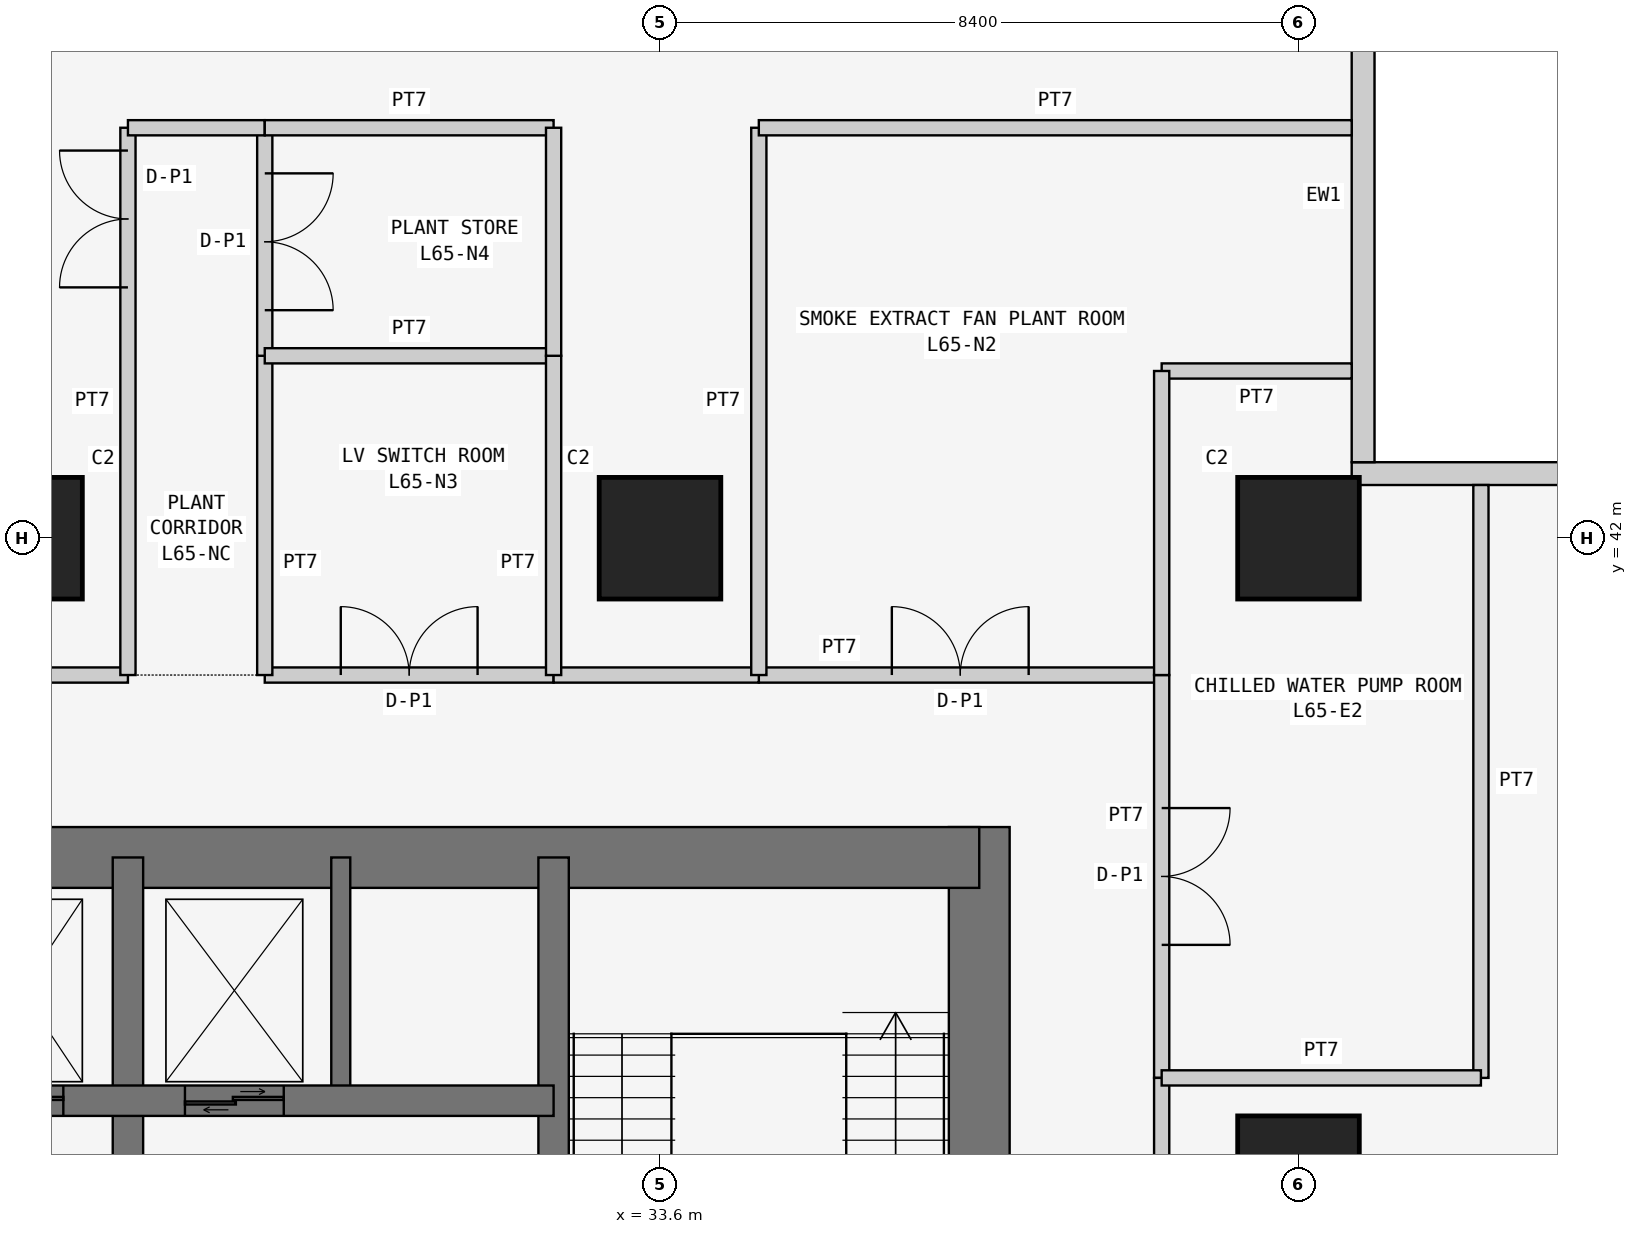
"""IFC4 building model, lengths in metres.
Left out: names, types, materials, properties, quantities, classifications, styles, units other than length and angle.
Written with IfcOpenShell. Run it as: python <this file> out.ifc"""

import sys

from ifc_helpers import new_model, si_unit, direction, frame, frame_2d, origin, origin_2d, place, context, subcontext, project, spatial, rectangle, extrude, element, fill, save


model = new_model("IFC4")
c1 = context("Model", 3, precision=1e-05, world=origin(), true_north=direction((0.0, 1.0)))
c2 = subcontext(c1, "Body", "Model", "MODEL_VIEW")
j1 = project(units=[si_unit("LENGTHUNIT", "METRE"), si_unit("PLANEANGLEUNIT", "RADIAN")], contexts=[c1])
p1 = place(None, origin())
s1 = spatial("IfcSite", under=j1, at=p1, CompositionType="ELEMENT")
p2 = place(p1, origin())
s2 = spatial("IfcBuilding", under=s1, at=p2, CompositionType="ELEMENT")
p3 = place(p2, frame((0.0, 0.0, 248.1)))
s3 = spatial("IfcBuildingStorey", under=s2, at=p3, CompositionType="ELEMENT", Elevation=248.1)
for number, where, z_axis, x_axis in (
    (1, (25.2, 42.0, 0.0), (0.0, 0.0, 1.0), (1.0, 0.0, 0.0)),
    (2, (33.6, 42.0, 0.0), (0.0, 0.0, 1.0), (1.0, 0.0, 0.0)),
    (3, (42.0, 33.6, 0.0), (0.0, 0.0, 1.0), (1.0, 0.0, 0.0)),
    (4, (42.0, 42.0, 0.0), (0.0, 0.0, 1.0), (1.0, 0.0, 0.0)),
):
    element("IfcColumn", number, at=place(p3, frame(where, z_axis=z_axis, x_axis=x_axis)), inside=s3, PredefinedType="COLUMN", context=c2, shape_type="SweptSolid", body=[
        extrude(rectangle(XDim=1.6, YDim=1.6, at=origin_2d()), origin(), (0.0, 0.0, 1.0), 6.0),
    ])
p4 = place(p3, frame((37.8, 21.0, 0.0), z_axis=(0.0, 0.0, 1.0), x_axis=(0.0, 1.0, 0.0)))
e5 = element("IfcWall", 5, at=p4, inside=s3, PredefinedType="SHEAR", context=c2, shape_type="SweptSolid", body=[
    extrude(rectangle(XDim=17.2, YDim=0.8, at=frame_2d((8.6, 0.0))), origin(), (0.0, 0.0, 1.0), 6.0),
])
p5 = place(p4, frame((5.2, 0.0, 0.0)))
e6 = element("IfcOpeningElement", 6, at=p5, cuts=e5, PredefinedType="OPENING", context=c2, shape_type="SweptSolid", body=[
    extrude(rectangle(XDim=1.2, YDim=2.1, at=frame_2d((0.6, 1.05))), frame((0.0, 0.41, 0.0), z_axis=(0.0, -1.0, 0.0), x_axis=(1.0, 0.0, 0.0)), (0.0, 0.0, 1.0), 0.82),
])
p6 = place(p3, frame((37.8, 37.8, 0.0), z_axis=(0.0, 0.0, 1.0), x_axis=(-1.0, 0.0, 0.0)))
e7 = element("IfcWall", 7, at=p6, inside=s3, PredefinedType="SHEAR", context=c2, shape_type="SweptSolid", body=[
    extrude(rectangle(XDim=17.2, YDim=0.8, at=frame_2d((8.6, 0.0))), origin(), (0.0, 0.0, 1.0), 6.0),
])
p7 = place(p3, frame((26.6, 21.0, 0.0), z_axis=(0.0, 0.0, 1.0), x_axis=(0.0, 1.0, 0.0)))
e8 = element("IfcWall", 8, at=p7, inside=s3, PredefinedType="SHEAR", context=c2, shape_type="SweptSolid", body=[
    extrude(rectangle(XDim=16.8, YDim=0.4, at=frame_2d((8.4, 0.0))), origin(), (0.0, 0.0, 1.0), 6.0),
])
p8 = place(p7, frame((10.4, 0.0, 0.0)))
e9 = element("IfcOpeningElement", 9, at=p8, cuts=e8, PredefinedType="OPENING", context=c2, shape_type="SweptSolid", body=[
    extrude(rectangle(XDim=1.2, YDim=2.1, at=frame_2d((0.6, 1.05))), frame((0.0, 0.21, 0.0), z_axis=(0.0, -1.0, 0.0), x_axis=(1.0, 0.0, 0.0)), (0.0, 0.0, 1.0), 0.42),
])
p9 = place(p3, frame((21.0, 34.6, 0.0), z_axis=(0.0, 0.0, 1.0), x_axis=(1.0, 0.0, 0.0)))
e10 = element("IfcWall", 10, at=p9, inside=s3, PredefinedType="SHEAR", context=c2, shape_type="SweptSolid", body=[
    extrude(rectangle(XDim=11.2, YDim=0.4, at=frame_2d((5.6, 0.0))), origin(), (0.0, 0.0, 1.0), 6.0),
])
p10 = place(p9, frame((1.0, 0.0, 0.0)))
e11 = element("IfcOpeningElement", 11, at=p10, cuts=e10, PredefinedType="OPENING", context=c2, shape_type="SweptSolid", body=[
    extrude(rectangle(XDim=1.1, YDim=2.1, at=frame_2d((0.55, 1.05))), frame((0.0, 0.21, 0.0), z_axis=(0.0, -1.0, 0.0), x_axis=(1.0, 0.0, 0.0)), (0.0, 0.0, 1.0), 0.42),
])
p11 = place(p9, frame((3.65, 0.0, 0.0)))
e12 = element("IfcOpeningElement", 12, at=p11, cuts=e10, PredefinedType="OPENING", context=c2, shape_type="SweptSolid", body=[
    extrude(rectangle(XDim=1.1, YDim=2.1, at=frame_2d((0.55, 1.05))), frame((0.0, 0.21, 0.0), z_axis=(0.0, -1.0, 0.0), x_axis=(1.0, 0.0, 0.0)), (0.0, 0.0, 1.0), 0.42),
])
p12 = place(p9, frame((6.35, 0.0, 0.0)))
e13 = element("IfcOpeningElement", 13, at=p12, cuts=e10, PredefinedType="OPENING", context=c2, shape_type="SweptSolid", body=[
    extrude(rectangle(XDim=1.3, YDim=2.1, at=frame_2d((0.65, 1.05))), frame((0.0, 0.21, 0.0), z_axis=(0.0, -1.0, 0.0), x_axis=(1.0, 0.0, 0.0)), (0.0, 0.0, 1.0), 0.42),
])
p13 = place(p3, frame((32.2, 29.2, 0.0), z_axis=(0.0, 0.0, 1.0), x_axis=(0.0, 1.0, 0.0)))
e14 = element("IfcWall", 14, at=p13, inside=s3, PredefinedType="SHEAR", context=c2, shape_type="SweptSolid", body=[
    extrude(rectangle(XDim=8.6, YDim=0.4, at=frame_2d((4.3, 0.0))), origin(), (0.0, 0.0, 1.0), 6.0),
])
p14 = place(p3, frame((29.4, 34.6, 0.0), z_axis=(0.0, 0.0, 1.0), x_axis=(0.0, 1.0, 0.0)))
e15 = element("IfcWall", 15, at=p14, inside=s3, PredefinedType="SHEAR", context=c2, shape_type="SweptSolid", body=[
    extrude(rectangle(XDim=3.2, YDim=0.25, at=frame_2d((1.6, 0.0))), origin(), (0.0, 0.0, 1.0), 6.0),
])
p15 = place(p3, frame((50.0, 42.85, 0.0), z_axis=(0.0, 0.0, 1.0), x_axis=(-1.0, 0.0, 0.0)))
e16 = element("IfcWall", 16, at=p15, inside=s3, PredefinedType="SOLIDWALL", context=c2, shape_type="SweptSolid", body=[
    extrude(rectangle(XDim=7.3, YDim=0.3, at=frame_2d((3.65, 0.0))), origin(), (0.0, 0.0, 1.0), 5.85),
])
p16 = place(p3, frame((42.85, 43.0, 0.0), z_axis=(0.0, 0.0, 1.0), x_axis=(0.0, 1.0, 0.0)))
e17 = element("IfcWall", 17, at=p16, inside=s3, PredefinedType="SOLIDWALL", context=c2, shape_type="SweptSolid", body=[
    extrude(rectangle(XDim=7.0, YDim=0.3, at=frame_2d((3.5, 0.0))), origin(), (0.0, 0.0, 1.0), 5.85),
])
p17 = place(p3, frame((34.9, 40.2, 0.0), z_axis=(0.0, 0.0, 1.0), x_axis=(1.0, 0.0, 0.0)))
e18 = element("IfcWall", 18, at=p17, inside=s3, PredefinedType="PARTITIONING", context=c2, shape_type="SweptSolid", body=[
    extrude(rectangle(XDim=5.3, YDim=0.2, at=frame_2d((2.65, 0.0))), origin(), (0.0, 0.0, 1.0), 5.85),
])
p18 = place(p17, frame((1.75, 0.0, 0.0)))
e19 = element("IfcOpeningElement", 19, at=p18, cuts=e18, PredefinedType="OPENING", context=c2, shape_type="SweptSolid", body=[
    extrude(rectangle(XDim=1.8, YDim=2.4, at=frame_2d((0.9, 1.2))), frame((0.0, 0.11, 0.0), z_axis=(0.0, -1.0, 0.0), x_axis=(1.0, 0.0, 0.0)), (0.0, 0.0, 1.0), 0.22),
])
p19 = place(p3, frame((28.4, 40.2, 0.0), z_axis=(0.0, 0.0, 1.0), x_axis=(1.0, 0.0, 0.0)))
e20 = element("IfcWall", 20, at=p19, inside=s3, PredefinedType="PARTITIONING", context=c2, shape_type="SweptSolid", body=[
    extrude(rectangle(XDim=3.8, YDim=0.2, at=frame_2d((1.9, 0.0))), origin(), (0.0, 0.0, 1.0), 5.85),
])
p20 = place(p19, frame((1.0, 0.0, 0.0)))
e21 = element("IfcOpeningElement", 21, at=p20, cuts=e20, PredefinedType="OPENING", context=c2, shape_type="SweptSolid", body=[
    extrude(rectangle(XDim=1.8, YDim=2.4, at=frame_2d((0.9, 1.2))), frame((0.0, 0.11, 0.0), z_axis=(0.0, -1.0, 0.0), x_axis=(1.0, 0.0, 0.0)), (0.0, 0.0, 1.0), 0.22),
])
p21 = place(p3, frame((23.9, 40.2, 0.0), z_axis=(0.0, 0.0, 1.0), x_axis=(1.0, 0.0, 0.0)))
e22 = element("IfcWall", 22, at=p21, inside=s3, PredefinedType="PARTITIONING", context=c2, shape_type="SweptSolid", body=[
    extrude(rectangle(XDim=2.7, YDim=0.2, at=frame_2d((1.35, 0.0))), origin(), (0.0, 0.0, 1.0), 5.85),
])
p22 = place(p3, frame((32.2, 40.2, 0.0), z_axis=(0.0, 0.0, 1.0), x_axis=(1.0, 0.0, 0.0)))
e23 = element("IfcWall", 23, at=p22, inside=s3, PredefinedType="PARTITIONING", context=c2, shape_type="SweptSolid", body=[
    extrude(rectangle(XDim=2.7, YDim=0.2, at=frame_2d((1.35, 0.0))), origin(), (0.0, 0.0, 1.0), 5.85),
])
p23 = place(p3, frame((40.2, 40.2, 0.0), z_axis=(0.0, 0.0, 1.0), x_axis=(0.0, -1.0, 0.0)))
e24 = element("IfcWall", 24, at=p23, inside=s3, PredefinedType="PARTITIONING", context=c2, shape_type="SweptSolid", body=[
    extrude(rectangle(XDim=5.3, YDim=0.2, at=frame_2d((2.65, 0.0))), origin(), (0.0, 0.0, 1.0), 5.85),
])
p24 = place(p23, frame((1.75, 0.0, 0.0)))
e25 = element("IfcOpeningElement", 25, at=p24, cuts=e24, PredefinedType="OPENING", context=c2, shape_type="SweptSolid", body=[
    extrude(rectangle(XDim=1.8, YDim=2.4, at=frame_2d((0.9, 1.2))), frame((0.0, 0.11, 0.0), z_axis=(0.0, -1.0, 0.0), x_axis=(1.0, 0.0, 0.0)), (0.0, 0.0, 1.0), 0.22),
])
p25 = place(p3, frame((40.2, 34.9, 0.0), z_axis=(0.0, 0.0, 1.0), x_axis=(0.0, -1.0, 0.0)))
e26 = element("IfcWall", 26, at=p25, inside=s3, PredefinedType="PARTITIONING", context=c2, shape_type="SweptSolid", body=[
    extrude(rectangle(XDim=2.7, YDim=0.2, at=frame_2d((1.35, 0.0))), origin(), (0.0, 0.0, 1.0), 5.85),
])
p26 = place(p3, frame((34.9, 40.2, 0.0), z_axis=(0.0, 0.0, 1.0), x_axis=(0.0, 1.0, 0.0)))
e27 = element("IfcWall", 27, at=p26, inside=s3, PredefinedType="PARTITIONING", context=c2, shape_type="SweptSolid", body=[
    extrude(rectangle(XDim=7.2, YDim=0.2, at=frame_2d((3.6, 0.0))), origin(), (0.0, 0.0, 1.0), 5.85),
])
p27 = place(p3, frame((34.9, 47.4, 0.0), z_axis=(0.0, 0.0, 1.0), x_axis=(1.0, 0.0, 0.0)))
e28 = element("IfcWall", 28, at=p27, inside=s3, PredefinedType="PARTITIONING", context=c2, shape_type="SweptSolid", body=[
    extrude(rectangle(XDim=7.8, YDim=0.2, at=frame_2d((3.9, 0.0))), origin(), (0.0, 0.0, 1.0), 5.85),
])
p28 = place(p3, frame((42.7, 44.2, 0.0), z_axis=(0.0, 0.0, 1.0), x_axis=(-1.0, 0.0, 0.0)))
e29 = element("IfcWall", 29, at=p28, inside=s3, PredefinedType="PARTITIONING", context=c2, shape_type="SweptSolid", body=[
    extrude(rectangle(XDim=2.5, YDim=0.2, at=frame_2d((1.25, 0.0))), origin(), (0.0, 0.0, 1.0), 5.85),
])
p29 = place(p3, frame((40.2, 44.2, 0.0), z_axis=(0.0, 0.0, 1.0), x_axis=(0.0, -1.0, 0.0)))
e30 = element("IfcWall", 30, at=p29, inside=s3, PredefinedType="PARTITIONING", context=c2, shape_type="SweptSolid", body=[
    extrude(rectangle(XDim=4.0, YDim=0.2, at=frame_2d((2.0, 0.0))), origin(), (0.0, 0.0, 1.0), 5.85),
])
p30 = place(p3, frame((28.4, 44.4, 0.0), z_axis=(0.0, 0.0, 1.0), x_axis=(0.0, -1.0, 0.0)))
e31 = element("IfcWall", 31, at=p30, inside=s3, PredefinedType="PARTITIONING", context=c2, shape_type="SweptSolid", body=[
    extrude(rectangle(XDim=4.2, YDim=0.2, at=frame_2d((2.1, 0.0))), origin(), (0.0, 0.0, 1.0), 5.85),
])
p31 = place(p3, frame((28.4, 47.4, 0.0), z_axis=(0.0, 0.0, 1.0), x_axis=(0.0, -1.0, 0.0)))
e32 = element("IfcWall", 32, at=p31, inside=s3, PredefinedType="PARTITIONING", context=c2, shape_type="SweptSolid", body=[
    extrude(rectangle(XDim=3.0, YDim=0.2, at=frame_2d((1.5, 0.0))), origin(), (0.0, 0.0, 1.0), 5.85),
])
p32 = place(p31, frame((0.6, 0.0, 0.0)))
e33 = element("IfcOpeningElement", 33, at=p32, cuts=e32, PredefinedType="OPENING", context=c2, shape_type="SweptSolid", body=[
    extrude(rectangle(XDim=1.8, YDim=2.4, at=frame_2d((0.9, 1.2))), frame((0.0, 0.11, 0.0), z_axis=(0.0, -1.0, 0.0), x_axis=(1.0, 0.0, 0.0)), (0.0, 0.0, 1.0), 0.22),
])
p33 = place(p3, frame((26.6, 40.2, 0.0), z_axis=(0.0, 0.0, 1.0), x_axis=(0.0, 1.0, 0.0)))
e34 = element("IfcWall", 34, at=p33, inside=s3, PredefinedType="PARTITIONING", context=c2, shape_type="SweptSolid", body=[
    extrude(rectangle(XDim=7.2, YDim=0.2, at=frame_2d((3.6, 0.0))), origin(), (0.0, 0.0, 1.0), 5.85),
])
p34 = place(p33, frame((5.1, 0.0, 0.0)))
e35 = element("IfcOpeningElement", 35, at=p34, cuts=e34, PredefinedType="OPENING", context=c2, shape_type="SweptSolid", body=[
    extrude(rectangle(XDim=1.8, YDim=2.4, at=frame_2d((0.9, 1.2))), frame((0.0, 0.11, 0.0), z_axis=(0.0, -1.0, 0.0), x_axis=(1.0, 0.0, 0.0)), (0.0, 0.0, 1.0), 0.22),
])
p35 = place(p3, frame((26.6, 47.4, 0.0), z_axis=(0.0, 0.0, 1.0), x_axis=(1.0, 0.0, 0.0)))
e36 = element("IfcWall", 36, at=p35, inside=s3, PredefinedType="PARTITIONING", context=c2, shape_type="SweptSolid", body=[
    extrude(rectangle(XDim=1.8, YDim=0.2, at=frame_2d((0.9, 0.0))), origin(), (0.0, 0.0, 1.0), 5.85),
])
p36 = place(p3, frame((28.4, 44.4, 0.0), z_axis=(0.0, 0.0, 1.0), x_axis=(1.0, 0.0, 0.0)))
e37 = element("IfcWall", 37, at=p36, inside=s3, PredefinedType="PARTITIONING", context=c2, shape_type="SweptSolid", body=[
    extrude(rectangle(XDim=3.8, YDim=0.2, at=frame_2d((1.9, 0.0))), origin(), (0.0, 0.0, 1.0), 5.85),
])
p37 = place(p3, frame((32.2, 44.4, 0.0), z_axis=(0.0, 0.0, 1.0), x_axis=(0.0, -1.0, 0.0)))
e38 = element("IfcWall", 38, at=p37, inside=s3, PredefinedType="PARTITIONING", context=c2, shape_type="SweptSolid", body=[
    extrude(rectangle(XDim=4.2, YDim=0.2, at=frame_2d((2.1, 0.0))), origin(), (0.0, 0.0, 1.0), 5.85),
])
p38 = place(p3, frame((28.4, 47.4, 0.0), z_axis=(0.0, 0.0, 1.0), x_axis=(1.0, 0.0, 0.0)))
e39 = element("IfcWall", 39, at=p38, inside=s3, PredefinedType="PARTITIONING", context=c2, shape_type="SweptSolid", body=[
    extrude(rectangle(XDim=3.8, YDim=0.2, at=frame_2d((1.9, 0.0))), origin(), (0.0, 0.0, 1.0), 5.85),
])
p39 = place(p3, frame((32.2, 47.4, 0.0), z_axis=(0.0, 0.0, 1.0), x_axis=(0.0, -1.0, 0.0)))
e40 = element("IfcWall", 40, at=p39, inside=s3, PredefinedType="PARTITIONING", context=c2, shape_type="SweptSolid", body=[
    extrude(rectangle(XDim=3.0, YDim=0.2, at=frame_2d((1.5, 0.0))), origin(), (0.0, 0.0, 1.0), 5.85),
])
p40 = place(p3, frame((44.4, 42.7, 0.0), z_axis=(0.0, 0.0, 1.0), x_axis=(0.0, -1.0, 0.0)))
e41 = element("IfcWall", 41, at=p40, inside=s3, PredefinedType="PARTITIONING", context=c2, shape_type="SweptSolid", body=[
    extrude(rectangle(XDim=7.8, YDim=0.2, at=frame_2d((3.9, 0.0))), origin(), (0.0, 0.0, 1.0), 5.85),
])
p41 = place(p3, frame((44.4, 34.9, 0.0), z_axis=(0.0, 0.0, 1.0), x_axis=(-1.0, 0.0, 0.0)))
e42 = element("IfcWall", 42, at=p41, inside=s3, PredefinedType="PARTITIONING", context=c2, shape_type="SweptSolid", body=[
    extrude(rectangle(XDim=4.2, YDim=0.2, at=frame_2d((2.1, 0.0))), origin(), (0.0, 0.0, 1.0), 5.85),
])
p42 = place(p18, origin())
e43 = element("IfcDoor", 43, at=p42, inside=s3, OperationType="DOUBLE_DOOR_SINGLE_SWING", PredefinedType="DOOR", context=c2, shape_type="SweptSolid", body=[
    extrude(rectangle(XDim=1.8, YDim=2.4, at=frame_2d((0.9, 1.2))), frame((0.0, 0.025, 0.0), z_axis=(0.0, -1.0, 0.0), x_axis=(1.0, 0.0, 0.0)), (0.0, 0.0, 1.0), 0.05),
])
fill(e19, e43)
p43 = place(p20, origin())
e44 = element("IfcDoor", 44, at=p43, inside=s3, OperationType="DOUBLE_DOOR_SINGLE_SWING", PredefinedType="DOOR", context=c2, shape_type="SweptSolid", body=[
    extrude(rectangle(XDim=1.8, YDim=2.4, at=frame_2d((0.9, 1.2))), frame((0.0, 0.025, 0.0), z_axis=(0.0, -1.0, 0.0), x_axis=(1.0, 0.0, 0.0)), (0.0, 0.0, 1.0), 0.05),
])
fill(e21, e44)
p44 = place(p32, origin())
e45 = element("IfcDoor", 45, at=p44, inside=s3, OperationType="DOUBLE_DOOR_SINGLE_SWING", PredefinedType="DOOR", context=c2, shape_type="SweptSolid", body=[
    extrude(rectangle(XDim=1.8, YDim=2.4, at=frame_2d((0.9, 1.2))), frame((0.0, 0.025, 0.0), z_axis=(0.0, -1.0, 0.0), x_axis=(1.0, 0.0, 0.0)), (0.0, 0.0, 1.0), 0.05),
])
fill(e33, e45)
p45 = place(p34, origin())
e46 = element("IfcDoor", 46, at=p45, inside=s3, OperationType="DOUBLE_DOOR_SINGLE_SWING", PredefinedType="DOOR", context=c2, shape_type="SweptSolid", body=[
    extrude(rectangle(XDim=1.8, YDim=2.4, at=frame_2d((0.9, 1.2))), frame((0.0, 0.025, 0.0), z_axis=(0.0, -1.0, 0.0), x_axis=(1.0, 0.0, 0.0)), (0.0, 0.0, 1.0), 0.05),
])
fill(e35, e46)
p46 = place(p24, origin())
e47 = element("IfcDoor", 47, at=p46, inside=s3, OperationType="DOUBLE_DOOR_SINGLE_SWING", PredefinedType="DOOR", context=c2, shape_type="SweptSolid", body=[
    extrude(rectangle(XDim=1.8, YDim=2.4, at=frame_2d((0.9, 1.2))), frame((0.0, 0.025, 0.0), z_axis=(0.0, -1.0, 0.0), x_axis=(1.0, 0.0, 0.0)), (0.0, 0.0, 1.0), 0.05),
])
fill(e25, e47)
p47 = place(p11, origin())
e48 = element("IfcDoor", 48, at=p47, inside=s3, OperationType="DOUBLE_DOOR_SLIDING", PredefinedType="DOOR", context=c2, shape_type="SweptSolid", body=[
    extrude(rectangle(XDim=1.1, YDim=2.1, at=frame_2d((0.55, 1.05))), frame((0.0, 0.025, 0.0), z_axis=(0.0, -1.0, 0.0), x_axis=(1.0, 0.0, 0.0)), (0.0, 0.0, 1.0), 0.05),
])
fill(e12, e48)
p48 = place(p12, origin())
e49 = element("IfcDoor", 49, at=p48, inside=s3, OperationType="DOUBLE_DOOR_SLIDING", PredefinedType="DOOR", context=c2, shape_type="SweptSolid", body=[
    extrude(rectangle(XDim=1.3, YDim=2.1, at=frame_2d((0.65, 1.05))), frame((0.0, 0.025, 0.0), z_axis=(0.0, -1.0, 0.0), x_axis=(1.0, 0.0, 0.0)), (0.0, 0.0, 1.0), 0.05),
])
fill(e13, e49)
save(model, sys.argv[1])
